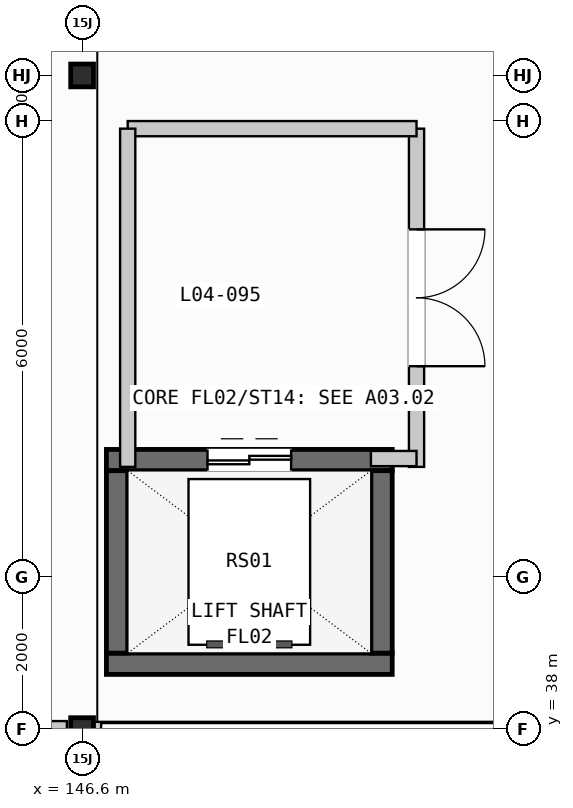
"""IFC4 building model, lengths in metres.
Left out: names, types, materials, properties, quantities, classifications, styles, units other than length and angle.
Written with IfcOpenShell. Run it as: python <this file> out.ifc"""

import sys

from ifc_helpers import new_model, si_unit, direction, frame, frame_2d, origin, origin_2d, place, context, subcontext, project, spatial, rectangle, i_section, extrude, element, fill, save


model = new_model("IFC4")
c1 = context("Model", 3, precision=1e-05, world=origin(), true_north=direction((0.0, 1.0)))
c2 = subcontext(c1, "Body", "Model", "MODEL_VIEW")
j1 = project(units=[si_unit("LENGTHUNIT", "METRE"), si_unit("PLANEANGLEUNIT", "RADIAN")], contexts=[c1])
p1 = place(None, origin())
s1 = spatial("IfcSite", under=j1, at=p1, CompositionType="ELEMENT")
p2 = place(p1, origin())
s2 = spatial("IfcBuilding", under=s1, at=p2, CompositionType="ELEMENT")
p3 = place(p2, frame((0.0, 0.0, 21.6)))
s3 = spatial("IfcBuildingStorey", under=s2, at=p3, CompositionType="ELEMENT", Elevation=21.6)
for number, where, z_axis, x_axis in (
    (1, (146.6, 38.0, 0.0), (0.0, 0.0, 1.0), (1.0, 0.0, 0.0)),
    (2, (146.6, 46.6, 0.0), (0.0, 0.0, 1.0), (1.0, 0.0, 0.0)),
):
    element("IfcColumn", number, at=place(p3, frame(where, z_axis=z_axis, x_axis=x_axis)), inside=s3, PredefinedType="COLUMN", context=c2, shape_type="SweptSolid", body=[
        extrude(i_section(OverallWidth=0.3, OverallDepth=0.3, WebThickness=0.011, FlangeThickness=0.019, FilletRadius=0.027, at=origin_2d()), origin(), (0.0, 0.0, 1.0), 4.8),
    ])
p4 = place(p3, frame((146.92, 38.86, 0.0), z_axis=(0.0, 0.0, 1.0), x_axis=(1.0, 0.0, 0.0)))
e3 = element("IfcWall", 3, at=p4, inside=s3, PredefinedType="SHEAR", context=c2, shape_type="SweptSolid", body=[
    extrude(rectangle(XDim=3.76, YDim=0.28, at=frame_2d((1.88, 0.0))), origin(), (0.0, 0.0, 1.0), 4.2),
])
p5 = place(p3, frame((146.92, 41.54, 0.0), z_axis=(0.0, 0.0, 1.0), x_axis=(1.0, 0.0, 0.0)))
e4 = element("IfcWall", 4, at=p5, inside=s3, PredefinedType="SHEAR", context=c2, shape_type="SweptSolid", body=[
    extrude(rectangle(XDim=3.76, YDim=0.28, at=frame_2d((1.88, 0.0))), origin(), (0.0, 0.0, 1.0), 4.2),
])
p6 = place(p5, frame((1.33, 0.0, 0.0)))
e5 = element("IfcOpeningElement", 5, at=p6, cuts=e4, PredefinedType="OPENING", context=c2, shape_type="SweptSolid", body=[
    extrude(rectangle(XDim=1.1, YDim=2.15, at=frame_2d((0.55, 1.075))), frame((0.0, 0.15, 0.0), z_axis=(0.0, -1.0, 0.0), x_axis=(1.0, 0.0, 0.0)), (0.0, 0.0, 1.0), 0.3),
])
for number, where, z_axis, x_axis in (
    (6, (147.06, 39.0, 0.0), (0.0, 0.0, 1.0), (0.0, 1.0, 0.0)),
    (7, (150.54, 39.0, 0.0), (0.0, 0.0, 1.0), (0.0, 1.0, 0.0)),
):
    element("IfcWall", number, at=place(p3, frame(where, z_axis=z_axis, x_axis=x_axis)), inside=s3, PredefinedType="SHEAR", context=c2, shape_type="SweptSolid", body=[
        extrude(rectangle(XDim=2.4, YDim=0.28, at=frame_2d((1.2, 0.0))), origin(), (0.0, 0.0, 1.0), 4.2),
    ])
p7 = place(p3, frame((92.0, 38.0, 4.8), z_axis=(0.0, 0.0, 1.0), x_axis=(1.0, 0.0, 0.0)))
e8 = element("IfcWall", 8, at=p7, inside=s3, PredefinedType="PARAPET", context=c2, shape_type="SweptSolid", body=[
    extrude(rectangle(XDim=54.4, YDim=0.212, at=frame_2d((27.2, 0.0))), origin(), (0.0, 0.0, 1.0), 0.95),
])
p8 = place(p3, frame((146.6, 38.0, 4.8), z_axis=(0.0, 0.0, 1.0), x_axis=(1.0, 0.0, 0.0)))
e9 = element("IfcWall", 9, at=p8, inside=s3, PredefinedType="PARAPET", context=c2, shape_type="SweptSolid", body=[
    extrude(rectangle(XDim=17.4, YDim=0.192, at=frame_2d((8.7, 0.0))), origin(), (0.0, 0.0, 1.0), 0.95),
])
p9 = place(p3, frame((151.0, 41.45, 0.0), z_axis=(0.0, 0.0, 1.0), x_axis=(0.0, 1.0, 0.0)))
e10 = element("IfcWall", 10, at=p9, inside=s3, PredefinedType="PARTITIONING", context=c2, shape_type="SweptSolid", body=[
    extrude(rectangle(XDim=4.45, YDim=0.2, at=frame_2d((2.225, 0.0))), origin(), (0.0, 0.0, 1.0), 4.0),
])
p10 = place(p9, frame((1.325, 0.0, 0.0)))
e11 = element("IfcOpeningElement", 11, at=p10, cuts=e10, PredefinedType="OPENING", context=c2, shape_type="SweptSolid", body=[
    extrude(rectangle(XDim=1.8, YDim=2.2, at=frame_2d((0.9, 1.1))), frame((0.0, 0.11, 0.0), z_axis=(0.0, -1.0, 0.0), x_axis=(1.0, 0.0, 0.0)), (0.0, 0.0, 1.0), 0.22),
])
p11 = place(p3, frame((147.2, 45.9, 0.0), z_axis=(0.0, 0.0, 1.0), x_axis=(1.0, 0.0, 0.0)))
e12 = element("IfcWall", 12, at=p11, inside=s3, PredefinedType="PARTITIONING", context=c2, shape_type="SweptSolid", body=[
    extrude(rectangle(XDim=3.8, YDim=0.2, at=frame_2d((1.9, 0.0))), origin(), (0.0, 0.0, 1.0), 4.0),
])
p12 = place(p3, frame((147.2, 41.45, 0.0), z_axis=(0.0, 0.0, 1.0), x_axis=(0.0, 1.0, 0.0)))
e13 = element("IfcWall", 13, at=p12, inside=s3, PredefinedType="PARTITIONING", context=c2, shape_type="SweptSolid", body=[
    extrude(rectangle(XDim=4.45, YDim=0.2, at=frame_2d((2.225, 0.0))), origin(), (0.0, 0.0, 1.0), 4.0),
])
p13 = place(p3, frame((150.4, 41.56, 0.0), z_axis=(0.0, 0.0, 1.0), x_axis=(1.0, 0.0, 0.0)))
e14 = element("IfcWall", 14, at=p13, inside=s3, PredefinedType="PARTITIONING", context=c2, shape_type="SweptSolid", body=[
    extrude(rectangle(XDim=0.6, YDim=0.2, at=frame_2d((0.3, 0.0))), origin(), (0.0, 0.0, 1.0), 4.0),
])
p14 = place(p6, origin())
e15 = element("IfcDoor", 15, at=p14, inside=s3, OperationType="DOUBLE_DOOR_SLIDING", PredefinedType="DOOR", context=c2, shape_type="SweptSolid", body=[
    extrude(rectangle(XDim=1.1, YDim=2.15, at=frame_2d((0.55, 1.075))), frame((0.0, 0.025, 0.0), z_axis=(0.0, -1.0, 0.0), x_axis=(1.0, 0.0, 0.0)), (0.0, 0.0, 1.0), 0.05),
])
fill(e5, e15)
p15 = place(p10, frame((1.8, 0.0, 0.0), z_axis=(0.0, 0.0, 1.0), x_axis=(-1.0, 0.0, 0.0)))
e16 = element("IfcDoor", 16, at=p15, inside=s3, OperationType="DOUBLE_DOOR_SINGLE_SWING", PredefinedType="DOOR", context=c2, shape_type="SweptSolid", body=[
    extrude(rectangle(XDim=1.8, YDim=2.2, at=frame_2d((0.9, 1.1))), frame((0.0, 0.025, 0.0), z_axis=(0.0, -1.0, 0.0), x_axis=(1.0, 0.0, 0.0)), (0.0, 0.0, 1.0), 0.05),
])
fill(e11, e16)
save(model, sys.argv[1])
